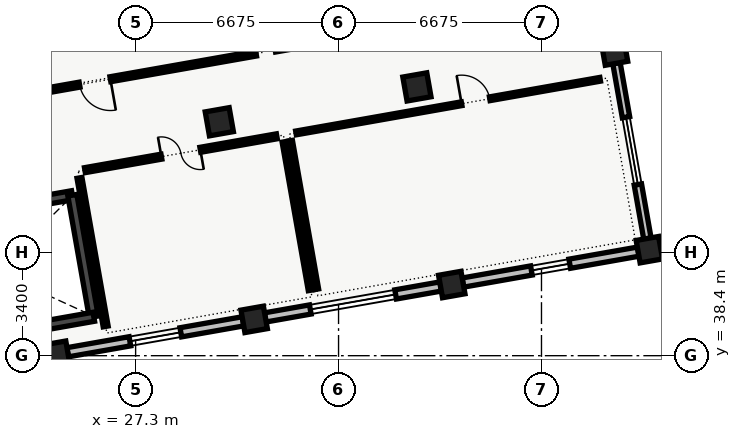
"""IFC4 building model, lengths in metres.
Left out: names, types, materials, properties, quantities, classifications, styles, units other than length and angle.
Written with IfcOpenShell. Run it as: python <this file> out.ifc"""

import sys

from ifc_helpers import new_model, si_unit, direction, frame, frame_2d, origin, origin_2d, place, context, subcontext, project, spatial, rectangle, extrude, element, fill, save


model = new_model("IFC4")
c1 = context("Model", 3, precision=1e-05, world=origin(), true_north=direction((0.0, 1.0)))
c2 = subcontext(c1, "Body", "Model", "MODEL_VIEW")
j1 = project(units=[si_unit("LENGTHUNIT", "METRE"), si_unit("PLANEANGLEUNIT", "RADIAN")], contexts=[c1])
p1 = place(None, origin())
s1 = spatial("IfcSite", under=j1, at=p1, CompositionType="ELEMENT")
p2 = place(p1, origin())
s2 = spatial("IfcBuilding", under=s1, at=p2, CompositionType="ELEMENT")
p3 = place(p2, frame((0.0, 0.0, 5.1)))
s3 = spatial("IfcBuildingStorey", under=s2, at=p3, CompositionType="ELEMENT", Elevation=5.1)
for number, where, z_axis, x_axis in (
    (1, (24.699, 38.448, 0.0), (0.0, 0.0, 1.0), (0.985, 0.174, 0.0)),
    (2, (31.199, 39.594, 0.0), (0.0, 0.0, 1.0), (0.985, 0.174, 0.0)),
):
    element("IfcColumn", number, at=place(p3, frame(where, z_axis=z_axis, x_axis=x_axis)), inside=s3, PredefinedType="COLUMN", context=c2, shape_type="SweptSolid", body=[
        extrude(rectangle(XDim=0.75, YDim=0.75, at=origin_2d()), origin(), (0.0, 0.0, 1.0), 4.31),
    ])
p4 = place(p3, frame((30.053, 46.094, 0.0), z_axis=(0.0, 0.0, 1.0), x_axis=(0.984807753012, 0.173648177667, 0.0)))
e3 = element("IfcColumn", 3, at=p4, inside=s3, PredefinedType="COLUMN", context=c2, shape_type="SweptSolid", body=[
    extrude(rectangle(XDim=0.8, YDim=0.8, at=origin_2d()), origin(), (0.0, 0.0, 1.0), 4.31),
])
p5 = place(p3, frame((37.699, 40.74, 0.0), z_axis=(0.0, 0.0, 1.0), x_axis=(0.984807753012, 0.173648177667, 0.0)))
e4 = element("IfcColumn", 4, at=p5, inside=s3, PredefinedType="COLUMN", context=c2, shape_type="SweptSolid", body=[
    extrude(rectangle(XDim=0.75, YDim=0.75, at=origin_2d()), origin(), (0.0, 0.0, 1.0), 4.31),
])
p6 = place(p3, frame((36.552, 47.24, 0.0), z_axis=(0.0, 0.0, 1.0), x_axis=(0.984807753012, 0.173648177667, 0.0)))
e5 = element("IfcColumn", 5, at=p6, inside=s3, PredefinedType="COLUMN", context=c2, shape_type="SweptSolid", body=[
    extrude(rectangle(XDim=0.8, YDim=0.8, at=origin_2d()), origin(), (0.0, 0.0, 1.0), 4.31),
])
for number, where, z_axis, x_axis in (
    (6, (44.198, 41.886, 0.0), (0.0, 0.0, 1.0), (0.985, 0.174, 0.0)),
    (7, (43.052, 48.386, 0.0), (0.0, 0.0, 1.0), (0.985, 0.174, 0.0)),
):
    element("IfcColumn", number, at=place(p3, frame(where, z_axis=z_axis, x_axis=x_axis)), inside=s3, PredefinedType="COLUMN", context=c2, shape_type="SweptSolid", body=[
        extrude(rectangle(XDim=0.75, YDim=0.75, at=origin_2d()), origin(), (0.0, 0.0, 1.0), 4.31),
    ])
p7 = place(p3, frame((43.116, 48.022, 0.0), z_axis=(0.0, 0.0, 1.0), x_axis=(0.1736474839, -0.984807875342, 0.0)))
e8 = element("IfcWall", 8, at=p7, inside=s3, PredefinedType="STANDARD", context=c2, shape_type="SweptSolid", body=[
    extrude(rectangle(XDim=5.86, YDim=0.245, at=frame_2d((2.93, 0.0))), origin(), (0.0, 0.0, 1.0), 3.795),
])
p8 = place(p7, frame((1.805, 0.0, 0.95)))
e9 = element("IfcOpeningElement", 9, at=p8, cuts=e8, PredefinedType="OPENING", context=c2, shape_type="SweptSolid", body=[
    extrude(rectangle(XDim=2.25, YDim=1.55, at=frame_2d((1.125, 0.775))), frame((0.0, 0.123, 0.0), z_axis=(0.0, -1.0, 0.0), x_axis=(1.0, 0.0, 0.0)), (0.0, 0.0, 1.0), 0.245),
])
p9 = place(p3, frame((43.834, 41.822, 0.0), z_axis=(0.0, 0.0, 1.0), x_axis=(-0.984807875342, -0.1736474839, 0.0)))
e10 = element("IfcWall", 10, at=p9, inside=s3, PredefinedType="STANDARD", context=c2, shape_type="SweptSolid", body=[
    extrude(rectangle(XDim=5.86, YDim=0.305, at=frame_2d((2.93, 0.0))), origin(), (0.0, 0.0, 1.0), 3.795),
])
p10 = place(p9, frame((2.29, 0.0, 0.95)))
e11 = element("IfcOpeningElement", 11, at=p10, cuts=e10, PredefinedType="OPENING", context=c2, shape_type="SweptSolid", body=[
    extrude(rectangle(XDim=1.28, YDim=1.42, at=frame_2d((0.64, 0.71))), frame((0.0, 0.152, 0.0), z_axis=(0.0, -1.0, 0.0), x_axis=(1.0, 0.0, 0.0)), (0.0, 0.0, 1.0), 0.305),
])
p11 = place(p3, frame((37.334, 40.676, 0.0), z_axis=(0.0, 0.0, 1.0), x_axis=(-0.984807875342, -0.1736474839, 0.0)))
e12 = element("IfcWall", 12, at=p11, inside=s3, PredefinedType="STANDARD", context=c2, shape_type="SweptSolid", body=[
    extrude(rectangle(XDim=5.86, YDim=0.305, at=frame_2d((2.93, 0.0))), origin(), (0.0, 0.0, 1.0), 3.795),
])
p12 = place(p11, frame((1.505, 0.0, 0.95)))
e13 = element("IfcOpeningElement", 13, at=p12, cuts=e12, PredefinedType="OPENING", context=c2, shape_type="SweptSolid", body=[
    extrude(rectangle(XDim=2.85, YDim=1.5, at=frame_2d((1.425, 0.75))), frame((0.0, 0.152, 0.0), z_axis=(0.0, -1.0, 0.0), x_axis=(1.0, 0.0, 0.0)), (0.0, 0.0, 1.0), 0.305),
])
p13 = place(p3, frame((30.834, 39.53, 0.0), z_axis=(0.0, 0.0, 1.0), x_axis=(-0.984807875342, -0.1736474839, 0.0)))
e14 = element("IfcWall", 14, at=p13, inside=s3, PredefinedType="STANDARD", context=c2, shape_type="SweptSolid", body=[
    extrude(rectangle(XDim=5.86, YDim=0.305, at=frame_2d((2.93, 0.0))), origin(), (0.0, 0.0, 1.0), 3.795),
])
p14 = place(p13, frame((2.08, 0.0, 0.95)))
e15 = element("IfcOpeningElement", 15, at=p14, cuts=e14, PredefinedType="OPENING", context=c2, shape_type="SweptSolid", body=[
    extrude(rectangle(XDim=1.7, YDim=1.55, at=frame_2d((0.85, 0.775))), frame((0.0, 0.152, 0.0), z_axis=(0.0, -1.0, 0.0), x_axis=(1.0, 0.0, 0.0)), (0.0, 0.0, 1.0), 0.305),
])
p15 = place(p3, frame((17.863, 42.381, 0.0), z_axis=(0.0, 0.0, 1.0), x_axis=(0.984808225754, 0.173645496596, 0.0)))
e16 = element("IfcWall", 16, at=p15, inside=s3, PredefinedType="SHEAR", context=c2, shape_type="SweptSolid", body=[
    extrude(rectangle(XDim=7.47, YDim=0.3, at=frame_2d((3.735, 0.0))), origin(), (0.0, 0.0, 1.0), 4.28),
])
p16 = place(p15, frame((0.18, 0.0, 0.0)))
e17 = element("IfcOpeningElement", 17, at=p16, cuts=e16, PredefinedType="OPENING", context=c2, shape_type="SweptSolid", body=[
    extrude(rectangle(XDim=1.18, YDim=2.15, at=frame_2d((0.59, 1.075))), frame((0.0, 0.15, 0.0), z_axis=(0.0, -1.0, 0.0), x_axis=(1.0, 0.0, 0.0)), (0.0, 0.0, 1.0), 0.3),
])
p17 = place(p3, frame((25.219, 43.678, 0.0), z_axis=(0.0, 0.0, 1.0), x_axis=(0.173665267602, -0.984804739443, 0.0)))
e18 = element("IfcWall", 18, at=p17, inside=s3, PredefinedType="SHEAR", context=c2, shape_type="SweptSolid", body=[
    extrude(rectangle(XDim=4.06, YDim=0.3, at=frame_2d((2.03, 0.0))), origin(), (0.0, 0.0, 1.0), 4.28),
])
p18 = place(p3, frame((25.924, 39.68, 0.0), z_axis=(0.0, 0.0, 1.0), x_axis=(-0.984809211193, -0.173639907711, 0.0)))
e19 = element("IfcWall", 19, at=p18, inside=s3, PredefinedType="SHEAR", context=c2, shape_type="SweptSolid", body=[
    extrude(rectangle(XDim=7.47, YDim=0.3, at=frame_2d((3.735, 0.0))), origin(), (0.0, 0.0, 1.0), 4.28),
])
p19 = place(p3, frame((20.665, 46.469, 0.0), z_axis=(0.0, 0.0, 1.0), x_axis=(0.984804338045, 0.173667543796, 0.0)))
e20 = element("IfcWall", 20, at=p19, inside=s3, PredefinedType="PARTITIONING", context=c2, shape_type="SweptSolid", body=[
    extrude(rectangle(XDim=10.76, YDim=0.165, at=frame_2d((5.38, 0.0))), origin(), (0.0, 0.0, 1.0), 3.95),
])
p20 = place(p19, frame((4.865, 0.0, 0.0)))
e21 = element("IfcOpeningElement", 21, at=p20, cuts=e20, PredefinedType="OPENING", context=c2, shape_type="SweptSolid", body=[
    extrude(rectangle(XDim=1.03, YDim=2.16, at=frame_2d((0.515, 1.08))), frame((0.0, 0.083, 0.0), z_axis=(0.0, -1.0, 0.0), x_axis=(1.0, 0.0, 0.0)), (0.0, 0.0, 1.0), 0.165),
])
p21 = place(p3, frame((31.892, 48.449, 0.0), z_axis=(0.0, 0.0, 1.0), x_axis=(0.984810592092, 0.173632075677, 0.0)))
e22 = element("IfcWall", 22, at=p21, inside=s3, PredefinedType="PARTITIONING", context=c2, shape_type="SweptSolid", body=[
    extrude(rectangle(XDim=10.36, YDim=0.125, at=frame_2d((5.18, 0.0))), origin(), (0.0, 0.0, 1.0), 3.95),
])
p22 = place(p21, frame((4.71, 0.0, 0.0)))
e23 = element("IfcOpeningElement", 23, at=p22, cuts=e22, PredefinedType="OPENING", context=c2, shape_type="SweptSolid", body=[
    extrude(rectangle(XDim=0.94, YDim=2.12, at=frame_2d((0.47, 1.06))), frame((0.0, 0.062, 0.0), z_axis=(0.0, -1.0, 0.0), x_axis=(1.0, 0.0, 0.0)), (0.0, 0.0, 1.0), 0.125),
])
p23 = place(p3, frame((33.061, 40.552, 0.0), z_axis=(0.0, 0.0, 1.0), x_axis=(-0.173658971256, 0.98480584975, 0.0)))
e24 = element("IfcWall", 24, at=p23, inside=s3, PredefinedType="PARTITIONING", context=c2, shape_type="SweptSolid", body=[
    extrude(rectangle(XDim=4.96, YDim=0.165, at=frame_2d((2.48, 0.0))), origin(), (0.0, 0.0, 1.0), 3.95),
])
p24 = place(p3, frame((31.945, 45.615, 0.0), z_axis=(0.0, 0.0, 1.0), x_axis=(-0.984809620557, -0.173637585958, 0.0)))
e25 = element("IfcWall", 25, at=p24, inside=s3, PredefinedType="PARTITIONING", context=c2, shape_type="SweptSolid", body=[
    extrude(rectangle(XDim=6.41, YDim=0.165, at=frame_2d((3.205, 0.0))), origin(), (0.0, 0.0, 1.0), 3.95),
])
p25 = place(p24, frame((2.555, 0.0, 0.0)))
e26 = element("IfcOpeningElement", 26, at=p25, cuts=e25, PredefinedType="OPENING", context=c2, shape_type="SweptSolid", body=[
    extrude(rectangle(XDim=1.3, YDim=2.18, at=frame_2d((0.65, 1.09))), frame((0.0, 0.083, 0.0), z_axis=(0.0, -1.0, 0.0), x_axis=(1.0, 0.0, 0.0)), (0.0, 0.0, 1.0), 0.165),
])
p26 = place(p3, frame((25.454, 44.247, 0.0), z_axis=(0.0, 0.0, 1.0), x_axis=(0.173658971256, -0.98480584975, 0.0)))
e27 = element("IfcWall", 27, at=p26, inside=s3, PredefinedType="PARTITIONING", context=c2, shape_type="SweptSolid", body=[
    extrude(rectangle(XDim=4.96, YDim=0.165, at=frame_2d((2.48, 0.0))), origin(), (0.0, 0.0, 1.0), 3.95),
])
p27 = place(p3, frame((42.581, 47.491, 0.0), z_axis=(0.0, 0.0, 1.0), x_axis=(-0.98480532288, -0.173661959067, 0.0)))
e28 = element("IfcWall", 28, at=p27, inside=s3, PredefinedType="PARTITIONING", context=c2, shape_type="SweptSolid", body=[
    extrude(rectangle(XDim=10.16, YDim=0.125, at=frame_2d((5.08, 0.0))), origin(), (0.0, 0.0, 1.0), 3.95),
])
p28 = place(p27, frame((3.688, 0.0, 0.0)))
e29 = element("IfcOpeningElement", 29, at=p28, cuts=e28, PredefinedType="OPENING", context=c2, shape_type="SweptSolid", body=[
    extrude(rectangle(XDim=0.94, YDim=2.12, at=frame_2d((0.47, 1.06))), frame((0.0, 0.062, 0.0), z_axis=(0.0, -1.0, 0.0), x_axis=(1.0, 0.0, 0.0)), (0.0, 0.0, 1.0), 0.125),
])
p29 = place(p3, frame((32.396, 45.472, 0.0), z_axis=(0.0, 0.0, 1.0), x_axis=(0.173650553511, -0.984807334084, 0.0)))
e30 = element("IfcWall", 30, at=p29, inside=s3, PredefinedType="PARTITIONING", context=c2, shape_type="SweptSolid", body=[
    extrude(rectangle(XDim=4.96, YDim=0.125, at=frame_2d((2.48, 0.0))), origin(), (0.0, 0.0, 1.0), 3.95),
])
p30 = place(p8, origin())
e31 = element("IfcWindow", 31, at=p30, inside=s3, PartitioningType="SINGLE_PANEL", PredefinedType="WINDOW", context=c2, shape_type="SweptSolid", body=[
    extrude(rectangle(XDim=2.25, YDim=1.55, at=frame_2d((1.125, 0.775))), frame((0.0, 0.03, 0.0), z_axis=(0.0, -1.0, 0.0), x_axis=(1.0, 0.0, 0.0)), (0.0, 0.0, 1.0), 0.06),
])
fill(e9, e31)
p31 = place(p10, origin())
e32 = element("IfcWindow", 32, at=p31, inside=s3, PartitioningType="SINGLE_PANEL", PredefinedType="WINDOW", context=c2, shape_type="SweptSolid", body=[
    extrude(rectangle(XDim=1.28, YDim=1.42, at=frame_2d((0.64, 0.71))), frame((0.0, 0.03, 0.0), z_axis=(0.0, -1.0, 0.0), x_axis=(1.0, 0.0, 0.0)), (0.0, 0.0, 1.0), 0.06),
])
fill(e11, e32)
p32 = place(p12, origin())
e33 = element("IfcWindow", 33, at=p32, inside=s3, PartitioningType="SINGLE_PANEL", PredefinedType="WINDOW", context=c2, shape_type="SweptSolid", body=[
    extrude(rectangle(XDim=2.85, YDim=1.5, at=frame_2d((1.425, 0.75))), frame((0.0, 0.03, 0.0), z_axis=(0.0, -1.0, 0.0), x_axis=(1.0, 0.0, 0.0)), (0.0, 0.0, 1.0), 0.06),
])
fill(e13, e33)
p33 = place(p14, origin())
e34 = element("IfcWindow", 34, at=p33, inside=s3, PartitioningType="SINGLE_PANEL", PredefinedType="WINDOW", context=c2, shape_type="SweptSolid", body=[
    extrude(rectangle(XDim=1.7, YDim=1.55, at=frame_2d((0.85, 0.775))), frame((0.0, 0.03, 0.0), z_axis=(0.0, -1.0, 0.0), x_axis=(1.0, 0.0, 0.0)), (0.0, 0.0, 1.0), 0.06),
])
fill(e15, e34)
p34 = place(p20, origin())
e35 = element("IfcDoor", 35, at=p34, inside=s3, OperationType="SINGLE_SWING_RIGHT", PredefinedType="DOOR", context=c2, shape_type="SweptSolid", body=[
    extrude(rectangle(XDim=1.03, YDim=2.16, at=frame_2d((0.515, 1.08))), frame((0.0, 0.025, 0.0), z_axis=(0.0, -1.0, 0.0), x_axis=(1.0, 0.0, 0.0)), (0.0, 0.0, 1.0), 0.05),
])
fill(e21, e35)
p35 = place(p25, origin())
e36 = element("IfcDoor", 36, at=p35, inside=s3, OperationType="DOUBLE_DOOR_SINGLE_SWING", PredefinedType="DOOR", context=c2, shape_type="SweptSolid", body=[
    extrude(rectangle(XDim=1.3, YDim=2.18, at=frame_2d((0.65, 1.09))), frame((0.0, 0.025, 0.0), z_axis=(0.0, -1.0, 0.0), x_axis=(1.0, 0.0, 0.0)), (0.0, 0.0, 1.0), 0.05),
])
fill(e26, e36)
p36 = place(p28, origin())
e37 = element("IfcDoor", 37, at=p36, inside=s3, OperationType="SINGLE_SWING_RIGHT", PredefinedType="DOOR", context=c2, shape_type="SweptSolid", body=[
    extrude(rectangle(XDim=0.94, YDim=2.12, at=frame_2d((0.47, 1.06))), frame((0.0, 0.025, 0.0), z_axis=(0.0, -1.0, 0.0), x_axis=(1.0, 0.0, 0.0)), (0.0, 0.0, 1.0), 0.05),
])
fill(e29, e37)
save(model, sys.argv[1])
